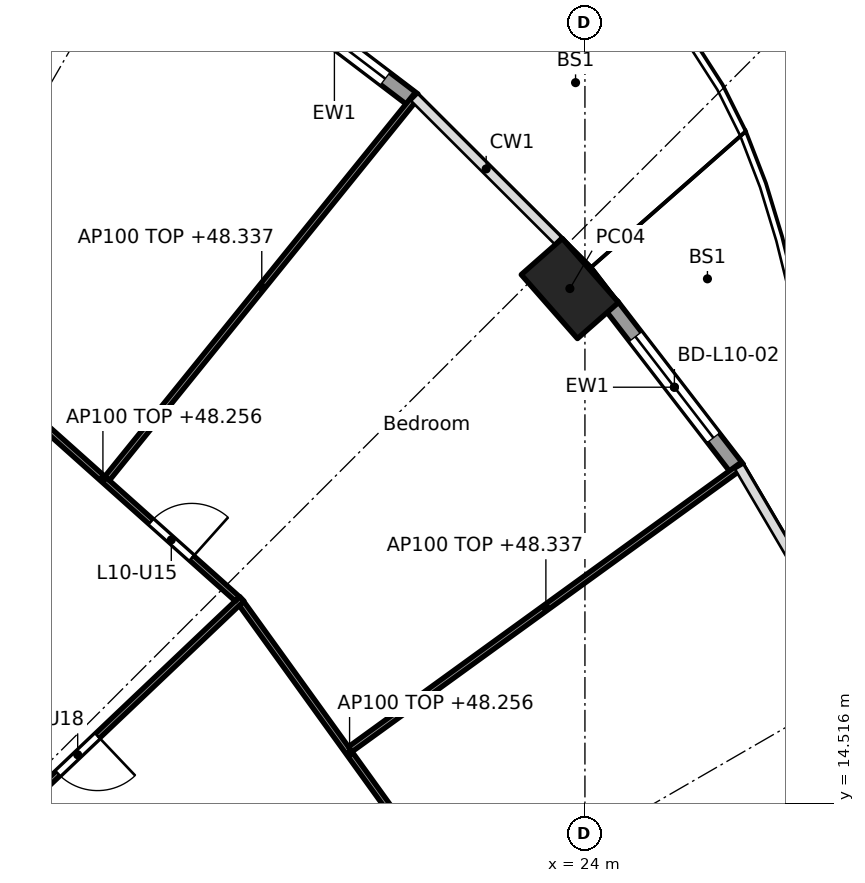
"""IFC4 building model, lengths in metres.
Left out: names, types, materials, properties, quantities, classifications, styles, units other than length and angle.
Written with IfcOpenShell. Run it as: python <this file> out.ifc"""

import sys

from ifc_helpers import new_model, si_unit, direction, frame, frame_2d, origin, origin_2d, place, context, subcontext, project, spatial, rectangle, hollow_rectangle, extrude, element, fill, save


model = new_model("IFC4")
c1 = context("Model", 3, precision=1e-05, world=origin(), true_north=direction((0.0, 1.0)))
c2 = subcontext(c1, "Body", "Model", "MODEL_VIEW")
j1 = project(units=[si_unit("LENGTHUNIT", "METRE"), si_unit("PLANEANGLEUNIT", "RADIAN")], contexts=[c1])
p1 = place(None, origin())
s1 = spatial("IfcSite", under=j1, at=p1, CompositionType="ELEMENT")
p2 = place(p1, origin())
s2 = spatial("IfcBuilding", under=s1, at=p2, CompositionType="ELEMENT")
p3 = place(p2, frame((0.0, 0.0, 45.5)))
s3 = spatial("IfcBuildingStorey", under=s2, at=p3, CompositionType="ELEMENT", Elevation=45.5)
p4 = place(p3, frame((23.752, 22.981, 0.0), z_axis=(0.0, 0.0, 1.0), x_axis=(-0.660114607735, 0.751164898445, 0.0)))
e1 = element("IfcColumn", 1, at=p4, inside=s3, PredefinedType="COLUMN", context=c2, shape_type="SweptSolid", body=[
    extrude(hollow_rectangle(XDim=1.4, YDim=0.9, WallThickness=0.05, at=origin_2d()), origin(), (0.0, 0.0, 1.0), 3.7),
])
p5 = place(p3, frame((24.434, 22.704, 0.0), z_axis=(0.0, 0.0, 1.0), x_axis=(0.610457147657, -0.792049285635, 0.0)))
e2 = element("IfcWall", 2, at=p5, inside=s3, PredefinedType="SOLIDWALL", context=c2, shape_type="SweptSolid", body=[
    extrude(rectangle(XDim=3.397, YDim=0.25, at=frame_2d((1.699, 0.0))), origin(), (0.0, 0.0, 1.0), 3.44),
])
p6 = place(p5, frame((0.649, 0.0, 0.0)))
e3 = element("IfcOpeningElement", 3, at=p6, cuts=e2, PredefinedType="OPENING", context=c2, shape_type="SweptSolid", body=[
    extrude(rectangle(XDim=2.1, YDim=2.4, at=frame_2d((1.05, 1.2))), frame((0.0, 0.135, 0.0), z_axis=(0.0, -1.0, 0.0), x_axis=(1.0, 0.0, 0.0)), (0.0, 0.0, 1.0), 0.27),
])
p7 = place(p3, frame((18.582, 28.056, 0.0), z_axis=(0.0, 0.0, 1.0), x_axis=(0.796022293214, -0.605267303517, 0.0)))
e4 = element("IfcWall", 4, at=p7, inside=s3, PredefinedType="SOLIDWALL", context=c2, shape_type="SweptSolid", body=[
    extrude(rectangle(XDim=3.262, YDim=0.25, at=frame_2d((1.631, 0.0))), origin(), (0.0, 0.0, 1.0), 3.44),
])
p8 = place(p7, frame((0.581, 0.0, 0.0)))
e5 = element("IfcOpeningElement", 5, at=p8, cuts=e4, PredefinedType="OPENING", context=c2, shape_type="SweptSolid", body=[
    extrude(rectangle(XDim=2.1, YDim=2.4, at=frame_2d((1.05, 1.2))), frame((0.0, 0.135, 0.0), z_axis=(0.0, -1.0, 0.0), x_axis=(1.0, 0.0, 0.0)), (0.0, 0.0, 1.0), 0.27),
])
p9 = place(p3, frame((21.908, 12.866, 0.0), z_axis=(0.0, 0.0, 1.0), x_axis=(-0.584558392935, 0.811351640936, 0.0)))
e6 = element("IfcWall", 6, at=p9, inside=s3, PredefinedType="PARTITIONING", context=c2, shape_type="SweptSolid", body=[
    extrude(rectangle(XDim=6.084, YDim=0.1, at=frame_2d((3.042, 0.0))), origin(), (0.0, 0.0, 1.0), 2.756),
])
p10 = place(p3, frame((20.141, 15.405, 0.0), z_axis=(0.0, 0.0, 1.0), x_axis=(0.809834895779, 0.58665785734, 0.0)))
e7 = element("IfcWall", 7, at=p10, inside=s3, PredefinedType="PARTITIONING", context=c2, shape_type="SweptSolid", body=[
    extrude(rectangle(XDim=7.945, YDim=0.1, at=frame_2d((3.973, 0.0))), origin(), (0.0, 0.0, 1.0), 2.837),
])
p11 = place(p3, frame((8.957, 8.953, 0.0), z_axis=(0.0, 0.0, 1.0), x_axis=(0.725250022034, 0.688485588476, 0.0)))
e8 = element("IfcWall", 8, at=p11, inside=s3, PredefinedType="PARTITIONING", context=c2, shape_type="SweptSolid", body=[
    extrude(rectangle(XDim=12.963, YDim=0.1, at=frame_2d((6.481, 0.0))), origin(), (0.0, 0.0, 1.0), 2.687),
])
p12 = place(p11, frame((8.79, 0.0, 0.0)))
e9 = element("IfcOpeningElement", 9, at=p12, cuts=e8, PredefinedType="OPENING", context=c2, shape_type="SweptSolid", body=[
    extrude(rectangle(XDim=0.9, YDim=2.1, at=frame_2d((0.45, 1.05))), frame((0.0, 0.06, 0.0), z_axis=(0.0, -1.0, 0.0), x_axis=(1.0, 0.0, 0.0)), (0.0, 0.0, 1.0), 0.12),
])
p13 = place(p3, frame((18.285, 17.877, 0.0), z_axis=(0.0, 0.0, 1.0), x_axis=(-0.745812746724, 0.666155647596, 0.0)))
e10 = element("IfcWall", 10, at=p13, inside=s3, PredefinedType="PARTITIONING", context=c2, shape_type="SweptSolid", body=[
    extrude(rectangle(XDim=5.931, YDim=0.1, at=frame_2d((2.965, 0.0))), origin(), (0.0, 0.0, 1.0), 2.756),
])
p14 = place(p13, frame((1.008, 0.0, 0.0)))
e11 = element("IfcOpeningElement", 11, at=p14, cuts=e10, PredefinedType="OPENING", context=c2, shape_type="SweptSolid", body=[
    extrude(rectangle(XDim=0.9, YDim=2.1, at=frame_2d((0.45, 1.05))), frame((0.0, 0.06, 0.0), z_axis=(0.0, -1.0, 0.0), x_axis=(1.0, 0.0, 0.0)), (0.0, 0.0, 1.0), 0.12),
])
p15 = place(p3, frame((16.142, 19.858, 0.0), z_axis=(0.0, 0.0, 1.0), x_axis=(0.628738066508, 0.777617157555, 0.0)))
e12 = element("IfcWall", 12, at=p15, inside=s3, PredefinedType="PARTITIONING", context=c2, shape_type="SweptSolid", body=[
    extrude(rectangle(XDim=8.091, YDim=0.1, at=frame_2d((4.045, 0.0))), origin(), (0.0, 0.0, 1.0), 2.837),
])
p16 = place(p6, origin())
e13 = element("IfcDoor", 13, at=p16, inside=s3, OperationType="SLIDING_TO_LEFT", PredefinedType="DOOR", context=c2, shape_type="SweptSolid", body=[
    extrude(rectangle(XDim=2.1, YDim=2.4, at=frame_2d((1.05, 1.2))), frame((0.0, 0.025, 0.0), z_axis=(0.0, -1.0, 0.0), x_axis=(1.0, 0.0, 0.0)), (0.0, 0.0, 1.0), 0.05),
])
fill(e3, e13)
p17 = place(p8, origin())
e14 = element("IfcDoor", 14, at=p17, inside=s3, OperationType="SLIDING_TO_LEFT", PredefinedType="DOOR", context=c2, shape_type="SweptSolid", body=[
    extrude(rectangle(XDim=2.1, YDim=2.4, at=frame_2d((1.05, 1.2))), frame((0.0, 0.025, 0.0), z_axis=(0.0, -1.0, 0.0), x_axis=(1.0, 0.0, 0.0)), (0.0, 0.0, 1.0), 0.05),
])
fill(e5, e14)
p18 = place(p14, frame((0.9, 0.0, 0.0), x_axis=(-1.0, 0.0, 0.0)))
e15 = element("IfcDoor", 15, at=p18, inside=s3, OperationType="SINGLE_SWING_RIGHT", PredefinedType="DOOR", context=c2, shape_type="SweptSolid", body=[
    extrude(rectangle(XDim=0.9, YDim=2.1, at=frame_2d((0.45, 1.05))), frame((0.0, 0.025, 0.0), z_axis=(0.0, -1.0, 0.0), x_axis=(1.0, 0.0, 0.0)), (0.0, 0.0, 1.0), 0.05),
])
fill(e11, e15)
p19 = place(p12, frame((0.9, 0.0, 0.0), x_axis=(-1.0, 0.0, 0.0)))
e16 = element("IfcDoor", 16, at=p19, inside=s3, OperationType="SINGLE_SWING_LEFT", PredefinedType="DOOR", context=c2, shape_type="SweptSolid", body=[
    extrude(rectangle(XDim=0.9, YDim=2.1, at=frame_2d((0.45, 1.05))), frame((0.0, 0.025, 0.0), z_axis=(0.0, -1.0, 0.0), x_axis=(1.0, 0.0, 0.0)), (0.0, 0.0, 1.0), 0.05),
])
fill(e9, e16)
save(model, sys.argv[1])
